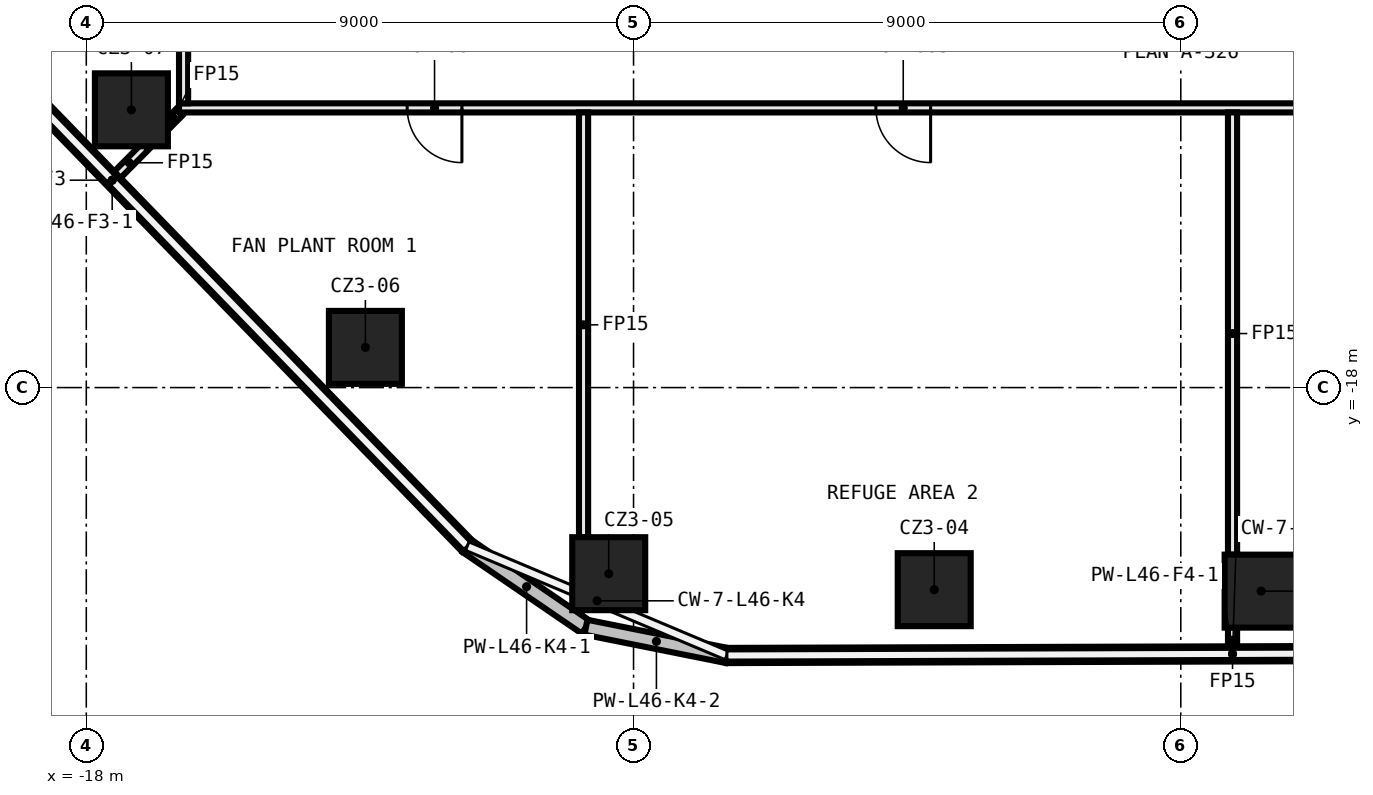
"""IFC4 building model, lengths in metres.
Left out: names, types, materials, properties, quantities, classifications, styles, units other than length and angle.
Written with IfcOpenShell. Run it as: python <this file> out.ifc"""

import sys

from ifc_helpers import new_model, si_unit, direction, frame, frame_2d, origin, origin_2d, place, context, subcontext, project, spatial, rectangle, extrude, element, fill, save


model = new_model("IFC4")
c1 = context("Model", 3, precision=1e-05, world=origin(), true_north=direction((0.0, 1.0)))
c2 = subcontext(c1, "Body", "Model", "MODEL_VIEW")
j1 = project(units=[si_unit("LENGTHUNIT", "METRE"), si_unit("PLANEANGLEUNIT", "RADIAN")], contexts=[c1])
p1 = place(None, origin())
s1 = spatial("IfcSite", under=j1, at=p1, CompositionType="ELEMENT")
p2 = place(p1, origin())
s2 = spatial("IfcBuilding", under=s1, at=p2, CompositionType="ELEMENT")
p3 = place(p2, frame((0.0, 0.0, 220.6)))
s3 = spatial("IfcBuildingStorey", under=s2, at=p3, CompositionType="ELEMENT", Elevation=220.6)
for number, where, z_axis, x_axis in (
    (1, (1.321, -21.348, 0.0), (0.0, 0.0, 1.0), (1.0, 0.0, 0.0)),
    (2, (-4.055, -21.324, 0.0), (0.0, 0.0, 1.0), (1.0, 0.0, 0.0)),
    (3, (-9.408, -21.061, 0.0), (0.0, 0.0, 1.0), (1.0, 0.0, 0.0)),
    (4, (-13.41, -17.339, 0.0), (0.0, 0.0, 1.0), (1.0, 0.0, 0.0)),
    (5, (-17.258, -13.432, 0.0), (0.0, 0.0, 1.0), (1.0, 0.0, 0.0)),
):
    element("IfcColumn", number, at=place(p3, frame(where, z_axis=z_axis, x_axis=x_axis)), inside=s3, PredefinedType="COLUMN", context=c2, shape_type="SweptSolid", body=[
        extrude(rectangle(XDim=1.2, YDim=1.2, at=origin_2d()), origin(), (0.0, 0.0, 1.0), 7.55),
    ])
p4 = place(p3, frame((16.475, -13.4, 0.0), z_axis=(0.0, 0.0, 1.0), x_axis=(-1.0, 0.0, 0.0)))
e6 = element("IfcWall", 6, at=p4, inside=s3, PredefinedType="PARTITIONING", context=c2, shape_type="SweptSolid", body=[
    extrude(rectangle(XDim=32.95, YDim=0.15, at=frame_2d((16.475, 0.0))), origin(), (0.0, 0.0, 1.0), 7.55),
])
p5 = place(p4, frame((28.298, 0.0, 0.0)))
e7 = element("IfcOpeningElement", 7, at=p5, cuts=e6, PredefinedType="OPENING", context=c2, shape_type="SweptSolid", body=[
    extrude(rectangle(XDim=0.9, YDim=2.1, at=frame_2d((0.45, 1.05))), frame((0.0, 0.085, 0.0), z_axis=(0.0, -1.0, 0.0), x_axis=(1.0, 0.0, 0.0)), (0.0, 0.0, 1.0), 0.17),
])
p6 = place(p4, frame((20.59, 0.0, 0.0)))
e8 = element("IfcOpeningElement", 8, at=p6, cuts=e6, PredefinedType="OPENING", context=c2, shape_type="SweptSolid", body=[
    extrude(rectangle(XDim=0.9, YDim=2.1, at=frame_2d((0.45, 1.05))), frame((0.0, 0.085, 0.0), z_axis=(0.0, -1.0, 0.0), x_axis=(1.0, 0.0, 0.0)), (0.0, 0.0, 1.0), 0.17),
])
p7 = place(p4, frame((12.541, 0.0, 0.0)))
e9 = element("IfcOpeningElement", 9, at=p7, cuts=e6, PredefinedType="OPENING", context=c2, shape_type="SweptSolid", body=[
    extrude(rectangle(XDim=0.9, YDim=2.1, at=frame_2d((0.45, 1.05))), frame((0.0, 0.085, 0.0), z_axis=(0.0, -1.0, 0.0), x_axis=(1.0, 0.0, 0.0)), (0.0, 0.0, 1.0), 0.17),
])
p8 = place(p3, frame((-17.562, -14.573, 0.0), z_axis=(0.0, 0.0, 1.0), x_axis=(0.703572116598, 0.710623864464, 0.0)))
e10 = element("IfcWall", 10, at=p8, inside=s3, PredefinedType="PARTITIONING", context=c2, shape_type="SweptSolid", body=[
    extrude(rectangle(XDim=0.762, YDim=0.15, at=frame_2d((0.381, 0.0))), origin(), (0.0, 0.0, 1.0), 7.55),
])
p9 = place(p3, frame((-16.658, -13.661, 0.0), z_axis=(0.0, 0.0, 1.0), x_axis=(0.703320480556, 0.710872915246, 0.0)))
e11 = element("IfcWall", 11, at=p9, inside=s3, PredefinedType="PARTITIONING", context=c2, shape_type="SweptSolid", body=[
    extrude(rectangle(XDim=0.259, YDim=0.15, at=frame_2d((0.129, 0.0))), origin(), (0.0, 0.0, 1.0), 7.55),
])
p10 = place(p3, frame((0.851, -22.361, 0.0), z_axis=(0.0, 0.0, 1.0), x_axis=(0.0, 1.0, 0.0)))
e12 = element("IfcWall", 12, at=p10, inside=s3, PredefinedType="PARTITIONING", context=c2, shape_type="SweptSolid", body=[
    extrude(rectangle(XDim=0.413, YDim=0.15, at=frame_2d((0.206, 0.0))), origin(), (0.0, 0.0, 1.0), 7.55),
])
p11 = place(p3, frame((0.851, -20.748, 0.0), z_axis=(0.0, 0.0, 1.0), x_axis=(0.0, 1.0, 0.0)))
e13 = element("IfcWall", 13, at=p11, inside=s3, PredefinedType="PARTITIONING", context=c2, shape_type="SweptSolid", body=[
    extrude(rectangle(XDim=7.273, YDim=0.15, at=frame_2d((3.636, 0.0))), origin(), (0.0, 0.0, 1.0), 7.55),
])
p12 = place(p3, frame((-9.822, -20.461, 0.0), z_axis=(0.0, 0.0, 1.0), x_axis=(0.0, 1.0, 0.0)))
e14 = element("IfcWall", 14, at=p12, inside=s3, PredefinedType="PARTITIONING", context=c2, shape_type="SweptSolid", body=[
    extrude(rectangle(XDim=6.986, YDim=0.15, at=frame_2d((3.493, 0.0))), origin(), (0.0, 0.0, 1.0), 7.55),
])
p13 = place(p3, frame((-16.4, -13.325, 0.0), z_axis=(0.0, 0.0, 1.0), x_axis=(0.0, 1.0, 0.0)))
e15 = element("IfcWall", 15, at=p13, inside=s3, PredefinedType="PARTITIONING", context=c2, shape_type="SweptSolid", body=[
    extrude(rectangle(XDim=26.65, YDim=0.15, at=frame_2d((13.325, 0.0))), origin(), (0.0, 0.0, 1.0), 7.55),
])
p14 = place(p13, frame((4.958, 0.0, 0.0)))
e16 = element("IfcOpeningElement", 16, at=p14, cuts=e15, PredefinedType="OPENING", context=c2, shape_type="SweptSolid", body=[
    extrude(rectangle(XDim=0.9, YDim=2.1, at=frame_2d((0.45, 1.05))), frame((0.0, 0.085, 0.0), z_axis=(0.0, -1.0, 0.0), x_axis=(1.0, 0.0, 0.0)), (0.0, 0.0, 1.0), 0.17),
])
p15 = place(p13, frame((20.917, 0.0, 0.0)))
e17 = element("IfcOpeningElement", 17, at=p15, cuts=e15, PredefinedType="OPENING", context=c2, shape_type="SweptSolid", body=[
    extrude(rectangle(XDim=0.9, YDim=2.1, at=frame_2d((0.45, 1.05))), frame((0.0, 0.085, 0.0), z_axis=(0.0, -1.0, 0.0), x_axis=(1.0, 0.0, 0.0)), (0.0, 0.0, 1.0), 0.17),
])
p16 = place(p3, frame((-23.414, -8.571, 0.0), z_axis=(0.0, 0.0, 1.0), x_axis=(0.696348823558, -0.717703501405, 0.0)))
e18 = element("IfcWall", 18, at=p16, inside=s3, PredefinedType="SOLIDWALL", context=c2, shape_type="SweptSolid", body=[
    extrude(rectangle(XDim=16.772, YDim=0.25, at=frame_2d((8.386, 0.0))), origin(), (0.0, 0.0, 1.0), 7.55),
])
for number, where, z_axis, x_axis in (
    (19, (-11.735, -20.608, 0.0), (0.0, 0.0, 1.0), (0.826, -0.564, 0.0)),
    (20, (-9.783, -21.942, 0.0), (0.0, 0.0, 1.0), (0.981, -0.197, 0.0)),
):
    element("IfcWall", number, at=place(p3, frame(where, z_axis=z_axis, x_axis=x_axis)), inside=s3, PredefinedType="SOLIDWALL", context=c2, shape_type="SweptSolid", body=[
        extrude(rectangle(XDim=2.364, YDim=0.25, at=frame_2d((1.182, 0.0))), origin(), (0.0, 0.0, 1.0), 7.55),
    ])
p17 = place(p3, frame((-7.465, -22.406, 0.0), z_axis=(0.0, 0.0, 1.0), x_axis=(0.999995157281, 0.003112139949, 0.0)))
e21 = element("IfcWall", 21, at=p17, inside=s3, PredefinedType="SOLIDWALL", context=c2, shape_type="SweptSolid", body=[
    extrude(rectangle(XDim=16.631, YDim=0.25, at=frame_2d((8.315, 0.0))), origin(), (0.0, 0.0, 1.0), 7.55),
])
p18 = place(p5, origin())
e22 = element("IfcDoor", 22, at=p18, inside=s3, OperationType="SINGLE_SWING_LEFT", PredefinedType="DOOR", context=c2, shape_type="SweptSolid", body=[
    extrude(rectangle(XDim=0.9, YDim=2.1, at=frame_2d((0.45, 1.05))), frame((0.0, 0.025, 0.0), z_axis=(0.0, -1.0, 0.0), x_axis=(1.0, 0.0, 0.0)), (0.0, 0.0, 1.0), 0.05),
])
fill(e7, e22)
p19 = place(p6, origin())
e23 = element("IfcDoor", 23, at=p19, inside=s3, OperationType="SINGLE_SWING_RIGHT", PredefinedType="DOOR", context=c2, shape_type="SweptSolid", body=[
    extrude(rectangle(XDim=0.9, YDim=2.1, at=frame_2d((0.45, 1.05))), frame((0.0, 0.025, 0.0), z_axis=(0.0, -1.0, 0.0), x_axis=(1.0, 0.0, 0.0)), (0.0, 0.0, 1.0), 0.05),
])
fill(e8, e23)
save(model, sys.argv[1])
